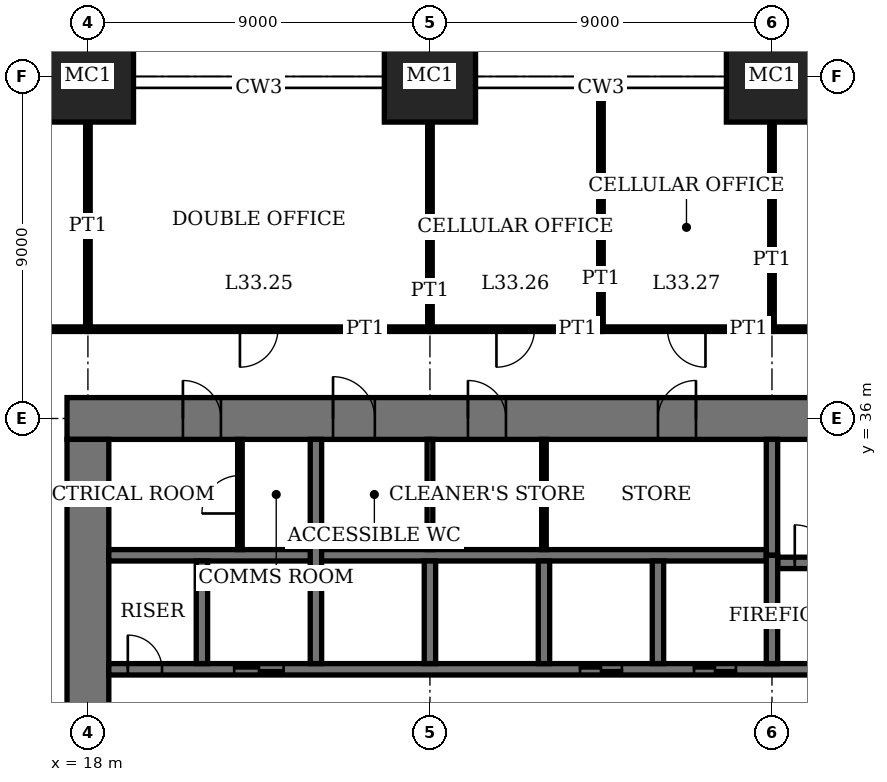
"""IFC4 building model, lengths in metres.
Left out: names, types, materials, properties, quantities, classifications, styles, units other than length and angle.
Written with IfcOpenShell. Run it as: python <this file> out.ifc"""

import sys

from ifc_helpers import new_model, si_unit, direction, frame, frame_2d, origin, origin_2d, place, context, subcontext, project, spatial, rectangle, extrude, element, fill, save


model = new_model("IFC4")
c1 = context("Model", 3, precision=1e-05, world=origin(), true_north=direction((0.0, 1.0)))
c2 = subcontext(c1, "Body", "Model", "MODEL_VIEW")
j1 = project(units=[si_unit("LENGTHUNIT", "METRE"), si_unit("PLANEANGLEUNIT", "RADIAN")], contexts=[c1])
p1 = place(None, origin())
s1 = spatial("IfcSite", under=j1, at=p1, CompositionType="ELEMENT")
p2 = place(p1, origin())
s2 = spatial("IfcBuilding", under=s1, at=p2, CompositionType="ELEMENT")
p3 = place(p2, frame((0.0, 0.0, 137.0)))
s3 = spatial("IfcBuildingStorey", under=s2, at=p3, CompositionType="ELEMENT", Elevation=137.0)
for number, where, z_axis, x_axis in (
    (1, (18.0, 45.0, 0.0), (0.0, 0.0, 1.0), (1.0, 0.0, 0.0)),
    (2, (27.0, 45.0, 0.0), (0.0, 0.0, 1.0), (1.0, 0.0, 0.0)),
    (3, (36.0, 45.0, 0.0), (0.0, 0.0, 1.0), (1.0, 0.0, 0.0)),
):
    element("IfcColumn", number, at=place(p3, frame(where, z_axis=z_axis, x_axis=x_axis)), inside=s3, PredefinedType="COLUMN", context=c2, shape_type="SweptSolid", body=[
        extrude(rectangle(XDim=2.4, YDim=2.4, at=origin_2d()), origin(), (0.0, 0.0, 1.0), 4.0),
    ])
p4 = place(p3, frame((45.55, 36.0, 0.0), z_axis=(0.0, 0.0, 1.0), x_axis=(-1.0, 0.0, 0.0)))
e4 = element("IfcWall", 4, at=p4, inside=s3, PredefinedType="SHEAR", context=c2, shape_type="SweptSolid", body=[
    extrude(rectangle(XDim=28.1, YDim=1.1, at=frame_2d((14.05, 0.0))), origin(), (0.0, 0.0, 1.0), 4.0),
])
p5 = place(p4, frame((11.55, 0.0, 0.0)))
e5 = element("IfcOpeningElement", 5, at=p5, cuts=e4, PredefinedType="OPENING", context=c2, shape_type="SweptSolid", body=[
    extrude(rectangle(XDim=1.0, YDim=2.4, at=frame_2d((0.5, 1.2))), frame((0.0, 0.56, 0.0), z_axis=(0.0, -1.0, 0.0), x_axis=(1.0, 0.0, 0.0)), (0.0, 0.0, 1.0), 1.12),
])
p6 = place(p4, frame((16.55, 0.0, 0.0)))
e6 = element("IfcOpeningElement", 6, at=p6, cuts=e4, PredefinedType="OPENING", context=c2, shape_type="SweptSolid", body=[
    extrude(rectangle(XDim=1.0, YDim=2.4, at=frame_2d((0.5, 1.2))), frame((0.0, 0.56, 0.0), z_axis=(0.0, -1.0, 0.0), x_axis=(1.0, 0.0, 0.0)), (0.0, 0.0, 1.0), 1.12),
])
p7 = place(p4, frame((20.0, 0.0, 0.0)))
e7 = element("IfcOpeningElement", 7, at=p7, cuts=e4, PredefinedType="OPENING", context=c2, shape_type="SweptSolid", body=[
    extrude(rectangle(XDim=1.1, YDim=2.4, at=frame_2d((0.55, 1.2))), frame((0.0, 0.56, 0.0), z_axis=(0.0, -1.0, 0.0), x_axis=(1.0, 0.0, 0.0)), (0.0, 0.0, 1.0), 1.12),
])
p8 = place(p4, frame((24.05, 0.0, 0.0)))
e8 = element("IfcOpeningElement", 8, at=p8, cuts=e4, PredefinedType="OPENING", context=c2, shape_type="SweptSolid", body=[
    extrude(rectangle(XDim=1.0, YDim=2.4, at=frame_2d((0.5, 1.2))), frame((0.0, 0.56, 0.0), z_axis=(0.0, -1.0, 0.0), x_axis=(1.0, 0.0, 0.0)), (0.0, 0.0, 1.0), 1.12),
])
p9 = place(p3, frame((18.0, 35.45, 0.0), z_axis=(0.0, 0.0, 1.0), x_axis=(0.0, -1.0, 0.0)))
e9 = element("IfcWall", 9, at=p9, inside=s3, PredefinedType="SHEAR", context=c2, shape_type="SweptSolid", body=[
    extrude(rectangle(XDim=16.9, YDim=1.1, at=frame_2d((8.45, 0.0))), origin(), (0.0, 0.0, 1.0), 4.0),
])
p10 = place(p9, frame((8.45, 0.0, 0.0)))
e10 = element("IfcOpeningElement", 10, at=p10, cuts=e9, PredefinedType="OPENING", context=c2, shape_type="SweptSolid", body=[
    extrude(rectangle(XDim=1.8, YDim=2.4, at=frame_2d((0.9, 1.2))), frame((0.0, 0.56, 0.0), z_axis=(0.0, -1.0, 0.0), x_axis=(1.0, 0.0, 0.0)), (0.0, 0.0, 1.0), 1.12),
])
p11 = place(p3, frame((36.15, 32.2, 0.0), z_axis=(0.0, 0.0, 1.0), x_axis=(1.0, 0.0, 0.0)))
e11 = element("IfcWall", 11, at=p11, inside=s3, PredefinedType="SHEAR", context=c2, shape_type="SweptSolid", body=[
    extrude(rectangle(XDim=8.3, YDim=0.3, at=frame_2d((4.15, 0.0))), origin(), (0.0, 0.0, 1.0), 4.0),
])
p12 = place(p11, frame((0.45, 0.0, 0.0)))
e12 = element("IfcOpeningElement", 12, at=p12, cuts=e11, PredefinedType="OPENING", context=c2, shape_type="SweptSolid", body=[
    extrude(rectangle(XDim=1.0, YDim=2.4, at=frame_2d((0.5, 1.2))), frame((0.0, 0.16, 0.0), z_axis=(0.0, -1.0, 0.0), x_axis=(1.0, 0.0, 0.0)), (0.0, 0.0, 1.0), 0.32),
])
p13 = place(p3, frame((36.0, 32.4, 0.0), z_axis=(0.0, 0.0, 1.0), x_axis=(0.0, 1.0, 0.0)))
e13 = element("IfcWall", 13, at=p13, inside=s3, PredefinedType="SHEAR", context=c2, shape_type="SweptSolid", body=[
    extrude(rectangle(XDim=3.05, YDim=0.3, at=frame_2d((1.525, 0.0))), origin(), (0.0, 0.0, 1.0), 4.0),
])
p14 = place(p3, frame((18.55, 29.4, 0.0), z_axis=(0.0, 0.0, 1.0), x_axis=(1.0, 0.0, 0.0)))
e14 = element("IfcWall", 14, at=p14, inside=s3, PredefinedType="SHEAR", context=c2, shape_type="SweptSolid", body=[
    extrude(rectangle(XDim=25.9, YDim=0.3, at=frame_2d((12.95, 0.0))), origin(), (0.0, 0.0, 1.0), 4.0),
])
p15 = place(p14, frame((19.95, 0.0, 0.0)))
e15 = element("IfcOpeningElement", 15, at=p15, cuts=e14, PredefinedType="OPENING", context=c2, shape_type="SweptSolid", body=[
    extrude(rectangle(XDim=1.0, YDim=2.4, at=frame_2d((0.5, 1.2))), frame((0.0, 0.16, 0.0), z_axis=(0.0, -1.0, 0.0), x_axis=(1.0, 0.0, 0.0)), (0.0, 0.0, 1.0), 0.32),
])
p16 = place(p14, frame((0.5, 0.0, 0.0)))
e16 = element("IfcOpeningElement", 16, at=p16, cuts=e14, PredefinedType="OPENING", context=c2, shape_type="SweptSolid", body=[
    extrude(rectangle(XDim=0.9, YDim=2.1, at=frame_2d((0.45, 1.05))), frame((0.0, 0.16, 0.0), z_axis=(0.0, -1.0, 0.0), x_axis=(1.0, 0.0, 0.0)), (0.0, 0.0, 1.0), 0.32),
])
p17 = place(p14, frame((15.4, 0.0, 0.0)))
e17 = element("IfcOpeningElement", 17, at=p17, cuts=e14, PredefinedType="OPENING", context=c2, shape_type="SweptSolid", body=[
    extrude(rectangle(XDim=1.1, YDim=2.4, at=frame_2d((0.55, 1.2))), frame((0.0, 0.16, 0.0), z_axis=(0.0, -1.0, 0.0), x_axis=(1.0, 0.0, 0.0)), (0.0, 0.0, 1.0), 0.32),
])
p18 = place(p14, frame((12.4, 0.0, 0.0)))
e18 = element("IfcOpeningElement", 18, at=p18, cuts=e14, PredefinedType="OPENING", context=c2, shape_type="SweptSolid", body=[
    extrude(rectangle(XDim=1.1, YDim=2.4, at=frame_2d((0.55, 1.2))), frame((0.0, 0.16, 0.0), z_axis=(0.0, -1.0, 0.0), x_axis=(1.0, 0.0, 0.0)), (0.0, 0.0, 1.0), 0.32),
])
p19 = place(p14, frame((3.3, 0.0, 0.0)))
e19 = element("IfcOpeningElement", 19, at=p19, cuts=e14, PredefinedType="OPENING", context=c2, shape_type="SweptSolid", body=[
    extrude(rectangle(XDim=1.3, YDim=2.4, at=frame_2d((0.65, 1.2))), frame((0.0, 0.16, 0.0), z_axis=(0.0, -1.0, 0.0), x_axis=(1.0, 0.0, 0.0)), (0.0, 0.0, 1.0), 0.32),
])
p20 = place(p3, frame((18.55, 32.4, 0.0), z_axis=(0.0, 0.0, 1.0), x_axis=(1.0, 0.0, 0.0)))
e20 = element("IfcWall", 20, at=p20, inside=s3, PredefinedType="SHEAR", context=c2, shape_type="SweptSolid", body=[
    extrude(rectangle(XDim=17.3, YDim=0.3, at=frame_2d((8.65, 0.0))), origin(), (0.0, 0.0, 1.0), 4.0),
])
for number, where, z_axis, x_axis in (
    (21, (33.0, 29.55, 0.0), (0.0, 0.0, 1.0), (0.0, 1.0, 0.0)),
    (22, (30.0, 29.55, 0.0), (0.0, 0.0, 1.0), (0.0, 1.0, 0.0)),
    (23, (27.0, 29.55, 0.0), (0.0, 0.0, 1.0), (0.0, 1.0, 0.0)),
):
    element("IfcWall", number, at=place(p3, frame(where, z_axis=z_axis, x_axis=x_axis)), inside=s3, PredefinedType="SHEAR", context=c2, shape_type="SweptSolid", body=[
        extrude(rectangle(XDim=2.7, YDim=0.3, at=frame_2d((1.35, 0.0))), origin(), (0.0, 0.0, 1.0), 4.0),
    ])
p21 = place(p3, frame((24.0, 29.55, 0.0), z_axis=(0.0, 0.0, 1.0), x_axis=(0.0, 1.0, 0.0)))
e24 = element("IfcWall", 24, at=p21, inside=s3, PredefinedType="SHEAR", context=c2, shape_type="SweptSolid", body=[
    extrude(rectangle(XDim=5.9, YDim=0.3, at=frame_2d((2.95, 0.0))), origin(), (0.0, 0.0, 1.0), 4.0),
])
p22 = place(p3, frame((21.0, 29.55, 0.0), z_axis=(0.0, 0.0, 1.0), x_axis=(0.0, 1.0, 0.0)))
e25 = element("IfcWall", 25, at=p22, inside=s3, PredefinedType="SHEAR", context=c2, shape_type="SweptSolid", body=[
    extrude(rectangle(XDim=2.7, YDim=0.3, at=frame_2d((1.35, 0.0))), origin(), (0.0, 0.0, 1.0), 4.0),
])
p23 = place(p3, frame((36.0, 29.55, 0.0), z_axis=(0.0, 0.0, 1.0), x_axis=(0.0, 1.0, 0.0)))
e26 = element("IfcWall", 26, at=p23, inside=s3, PredefinedType="SHEAR", context=c2, shape_type="SweptSolid", body=[
    extrude(rectangle(XDim=2.85, YDim=0.3, at=frame_2d((1.425, 0.0))), origin(), (0.0, 0.0, 1.0), 4.0),
])
p24 = place(p3, frame((9.0, 38.35, 0.0), z_axis=(0.0, 0.0, 1.0), x_axis=(1.0, 0.0, 0.0)))
e27 = element("IfcWall", 27, at=p24, inside=s3, PredefinedType="PARTITIONING", context=c2, shape_type="SweptSolid", body=[
    extrude(rectangle(XDim=9.0, YDim=0.12, at=frame_2d((4.5, 0.0))), origin(), (0.0, 0.0, 1.0), 3.75),
])
p25 = place(p24, frame((4.0, 0.0, 0.0)))
e28 = element("IfcOpeningElement", 28, at=p25, cuts=e27, PredefinedType="OPENING", context=c2, shape_type="SweptSolid", body=[
    extrude(rectangle(XDim=1.0, YDim=2.4, at=frame_2d((0.5, 1.2))), frame((0.0, 0.07, 0.0), z_axis=(0.0, -1.0, 0.0), x_axis=(1.0, 0.0, 0.0)), (0.0, 0.0, 1.0), 0.14),
])
p26 = place(p3, frame((18.0, 38.35, 0.0), z_axis=(0.0, 0.0, 1.0), x_axis=(1.0, 0.0, 0.0)))
e29 = element("IfcWall", 29, at=p26, inside=s3, PredefinedType="PARTITIONING", context=c2, shape_type="SweptSolid", body=[
    extrude(rectangle(XDim=9.0, YDim=0.12, at=frame_2d((4.5, 0.0))), origin(), (0.0, 0.0, 1.0), 3.75),
])
p27 = place(p26, frame((4.0, 0.0, 0.0)))
e30 = element("IfcOpeningElement", 30, at=p27, cuts=e29, PredefinedType="OPENING", context=c2, shape_type="SweptSolid", body=[
    extrude(rectangle(XDim=1.0, YDim=2.4, at=frame_2d((0.5, 1.2))), frame((0.0, 0.07, 0.0), z_axis=(0.0, -1.0, 0.0), x_axis=(1.0, 0.0, 0.0)), (0.0, 0.0, 1.0), 0.14),
])
p28 = place(p3, frame((27.0, 38.35, 0.0), z_axis=(0.0, 0.0, 1.0), x_axis=(1.0, 0.0, 0.0)))
e31 = element("IfcWall", 31, at=p28, inside=s3, PredefinedType="PARTITIONING", context=c2, shape_type="SweptSolid", body=[
    extrude(rectangle(XDim=4.5, YDim=0.12, at=frame_2d((2.25, 0.0))), origin(), (0.0, 0.0, 1.0), 3.75),
])
p29 = place(p28, frame((1.75, 0.0, 0.0)))
e32 = element("IfcOpeningElement", 32, at=p29, cuts=e31, PredefinedType="OPENING", context=c2, shape_type="SweptSolid", body=[
    extrude(rectangle(XDim=1.0, YDim=2.4, at=frame_2d((0.5, 1.2))), frame((0.0, 0.07, 0.0), z_axis=(0.0, -1.0, 0.0), x_axis=(1.0, 0.0, 0.0)), (0.0, 0.0, 1.0), 0.14),
])
p30 = place(p3, frame((31.5, 38.35, 0.0), z_axis=(0.0, 0.0, 1.0), x_axis=(1.0, 0.0, 0.0)))
e33 = element("IfcWall", 33, at=p30, inside=s3, PredefinedType="PARTITIONING", context=c2, shape_type="SweptSolid", body=[
    extrude(rectangle(XDim=4.5, YDim=0.12, at=frame_2d((2.25, 0.0))), origin(), (0.0, 0.0, 1.0), 3.75),
])
p31 = place(p30, frame((1.75, 0.0, 0.0)))
e34 = element("IfcOpeningElement", 34, at=p31, cuts=e33, PredefinedType="OPENING", context=c2, shape_type="SweptSolid", body=[
    extrude(rectangle(XDim=1.0, YDim=2.4, at=frame_2d((0.5, 1.2))), frame((0.0, 0.07, 0.0), z_axis=(0.0, -1.0, 0.0), x_axis=(1.0, 0.0, 0.0)), (0.0, 0.0, 1.0), 0.14),
])
p32 = place(p3, frame((36.0, 38.35, 0.0), z_axis=(0.0, 0.0, 1.0), x_axis=(1.0, 0.0, 0.0)))
e35 = element("IfcWall", 35, at=p32, inside=s3, PredefinedType="PARTITIONING", context=c2, shape_type="SweptSolid", body=[
    extrude(rectangle(XDim=9.0, YDim=0.12, at=frame_2d((4.5, 0.0))), origin(), (0.0, 0.0, 1.0), 3.75),
])
p33 = place(p32, frame((4.0, 0.0, 0.0)))
e36 = element("IfcOpeningElement", 36, at=p33, cuts=e35, PredefinedType="OPENING", context=c2, shape_type="SweptSolid", body=[
    extrude(rectangle(XDim=1.0, YDim=2.4, at=frame_2d((0.5, 1.2))), frame((0.0, 0.07, 0.0), z_axis=(0.0, -1.0, 0.0), x_axis=(1.0, 0.0, 0.0)), (0.0, 0.0, 1.0), 0.14),
])
for number, where, z_axis, x_axis in (
    (37, (18.0, 38.35, 0.0), (0.0, 0.0, 1.0), (0.0, 1.0, 0.0)),
    (38, (27.0, 38.35, 0.0), (0.0, 0.0, 1.0), (0.0, 1.0, 0.0)),
):
    element("IfcWall", number, at=place(p3, frame(where, z_axis=z_axis, x_axis=x_axis)), inside=s3, PredefinedType="PARTITIONING", context=c2, shape_type="SweptSolid", body=[
        extrude(rectangle(XDim=5.45, YDim=0.12, at=frame_2d((2.725, 0.0))), origin(), (0.0, 0.0, 1.0), 3.05),
    ])
p34 = place(p3, frame((31.5, 38.35, 0.0), z_axis=(0.0, 0.0, 1.0), x_axis=(0.0, 1.0, 0.0)))
e39 = element("IfcWall", 39, at=p34, inside=s3, PredefinedType="PARTITIONING", context=c2, shape_type="SweptSolid", body=[
    extrude(rectangle(XDim=6.34, YDim=0.12, at=frame_2d((3.17, 0.0))), origin(), (0.0, 0.0, 1.0), 3.75),
])
p35 = place(p3, frame((36.0, 38.35, 0.0), z_axis=(0.0, 0.0, 1.0), x_axis=(0.0, 1.0, 0.0)))
e40 = element("IfcWall", 40, at=p35, inside=s3, PredefinedType="PARTITIONING", context=c2, shape_type="SweptSolid", body=[
    extrude(rectangle(XDim=5.45, YDim=0.12, at=frame_2d((2.725, 0.0))), origin(), (0.0, 0.0, 1.0), 3.05),
])
p36 = place(p3, frame((30.0, 32.55, 0.0), z_axis=(0.0, 0.0, 1.0), x_axis=(0.0, 1.0, 0.0)))
e41 = element("IfcWall", 41, at=p36, inside=s3, PredefinedType="PARTITIONING", context=c2, shape_type="SweptSolid", body=[
    extrude(rectangle(XDim=2.9, YDim=0.12, at=frame_2d((1.45, 0.0))), origin(), (0.0, 0.0, 1.0), 3.75),
])
p37 = place(p3, frame((27.0, 32.55, 0.0), z_axis=(0.0, 0.0, 1.0), x_axis=(0.0, 1.0, 0.0)))
e42 = element("IfcWall", 42, at=p37, inside=s3, PredefinedType="PARTITIONING", context=c2, shape_type="SweptSolid", body=[
    extrude(rectangle(XDim=2.9, YDim=0.15, at=frame_2d((1.45, 0.0))), origin(), (0.0, 0.0, 1.0), 3.75),
])
p38 = place(p3, frame((22.0, 32.55, 0.0), z_axis=(0.0, 0.0, 1.0), x_axis=(0.0, 1.0, 0.0)))
e43 = element("IfcWall", 43, at=p38, inside=s3, PredefinedType="PARTITIONING", context=c2, shape_type="SweptSolid", body=[
    extrude(rectangle(XDim=2.9, YDim=0.12, at=frame_2d((1.45, 0.0))), origin(), (0.0, 0.0, 1.0), 3.75),
])
p39 = place(p38, frame((0.95, 0.0, 0.0)))
e44 = element("IfcOpeningElement", 44, at=p39, cuts=e43, PredefinedType="OPENING", context=c2, shape_type="SweptSolid", body=[
    extrude(rectangle(XDim=1.0, YDim=2.4, at=frame_2d((0.5, 1.2))), frame((0.0, 0.07, 0.0), z_axis=(0.0, -1.0, 0.0), x_axis=(1.0, 0.0, 0.0)), (0.0, 0.0, 1.0), 0.14),
])
p40 = place(p5, origin())
e45 = element("IfcDoor", 45, at=p40, inside=s3, OperationType="SINGLE_SWING_LEFT", PredefinedType="DOOR", context=c2, shape_type="SweptSolid", body=[
    extrude(rectangle(XDim=1.0, YDim=2.4, at=frame_2d((0.5, 1.2))), frame((0.0, 0.025, 0.0), z_axis=(0.0, -1.0, 0.0), x_axis=(1.0, 0.0, 0.0)), (0.0, 0.0, 1.0), 0.05),
    extrude(rectangle(XDim=0.04, YDim=2.4, at=frame_2d((0.02, 1.2))), frame((0.0, 0.4, 0.0), z_axis=(0.0, -1.0, 0.0), x_axis=(1.0, 0.0, 0.0)), (0.0, 0.0, 1.0), 0.8),
    extrude(rectangle(XDim=0.04, YDim=2.4, at=frame_2d((0.98, 1.2))), frame((0.0, 0.4, 0.0), z_axis=(0.0, -1.0, 0.0), x_axis=(1.0, 0.0, 0.0)), (0.0, 0.0, 1.0), 0.8),
    extrude(rectangle(XDim=1.0, YDim=0.04, at=frame_2d((0.5, 2.38))), frame((0.0, 0.4, 0.0), z_axis=(0.0, -1.0, 0.0), x_axis=(1.0, 0.0, 0.0)), (0.0, 0.0, 1.0), 0.8),
])
fill(e5, e45)
p41 = place(p6, origin())
e46 = element("IfcDoor", 46, at=p41, inside=s3, OperationType="SINGLE_SWING_RIGHT", PredefinedType="DOOR", context=c2, shape_type="SweptSolid", body=[
    extrude(rectangle(XDim=1.0, YDim=2.4, at=frame_2d((0.5, 1.2))), frame((0.0, 0.025, 0.0), z_axis=(0.0, -1.0, 0.0), x_axis=(1.0, 0.0, 0.0)), (0.0, 0.0, 1.0), 0.05),
    extrude(rectangle(XDim=0.04, YDim=2.4, at=frame_2d((0.02, 1.2))), frame((0.0, 0.4, 0.0), z_axis=(0.0, -1.0, 0.0), x_axis=(1.0, 0.0, 0.0)), (0.0, 0.0, 1.0), 0.8),
    extrude(rectangle(XDim=0.04, YDim=2.4, at=frame_2d((0.98, 1.2))), frame((0.0, 0.4, 0.0), z_axis=(0.0, -1.0, 0.0), x_axis=(1.0, 0.0, 0.0)), (0.0, 0.0, 1.0), 0.8),
    extrude(rectangle(XDim=1.0, YDim=0.04, at=frame_2d((0.5, 2.38))), frame((0.0, 0.4, 0.0), z_axis=(0.0, -1.0, 0.0), x_axis=(1.0, 0.0, 0.0)), (0.0, 0.0, 1.0), 0.8),
])
fill(e6, e46)
p42 = place(p7, origin())
e47 = element("IfcDoor", 47, at=p42, inside=s3, OperationType="SINGLE_SWING_RIGHT", PredefinedType="DOOR", context=c2, shape_type="SweptSolid", body=[
    extrude(rectangle(XDim=1.1, YDim=2.4, at=frame_2d((0.55, 1.2))), frame((0.0, 0.025, 0.0), z_axis=(0.0, -1.0, 0.0), x_axis=(1.0, 0.0, 0.0)), (0.0, 0.0, 1.0), 0.05),
    extrude(rectangle(XDim=0.04, YDim=2.4, at=frame_2d((0.02, 1.2))), frame((0.0, 0.44, 0.0), z_axis=(0.0, -1.0, 0.0), x_axis=(1.0, 0.0, 0.0)), (0.0, 0.0, 1.0), 0.88),
    extrude(rectangle(XDim=0.04, YDim=2.4, at=frame_2d((1.08, 1.2))), frame((0.0, 0.44, 0.0), z_axis=(0.0, -1.0, 0.0), x_axis=(1.0, 0.0, 0.0)), (0.0, 0.0, 1.0), 0.88),
    extrude(rectangle(XDim=1.1, YDim=0.04, at=frame_2d((0.55, 2.38))), frame((0.0, 0.44, 0.0), z_axis=(0.0, -1.0, 0.0), x_axis=(1.0, 0.0, 0.0)), (0.0, 0.0, 1.0), 0.88),
])
fill(e7, e47)
p43 = place(p8, origin())
e48 = element("IfcDoor", 48, at=p43, inside=s3, OperationType="SINGLE_SWING_RIGHT", PredefinedType="DOOR", context=c2, shape_type="SweptSolid", body=[
    extrude(rectangle(XDim=1.0, YDim=2.4, at=frame_2d((0.5, 1.2))), frame((0.0, 0.025, 0.0), z_axis=(0.0, -1.0, 0.0), x_axis=(1.0, 0.0, 0.0)), (0.0, 0.0, 1.0), 0.05),
    extrude(rectangle(XDim=0.04, YDim=2.4, at=frame_2d((0.02, 1.2))), frame((0.0, 0.4, 0.0), z_axis=(0.0, -1.0, 0.0), x_axis=(1.0, 0.0, 0.0)), (0.0, 0.0, 1.0), 0.8),
    extrude(rectangle(XDim=0.04, YDim=2.4, at=frame_2d((0.98, 1.2))), frame((0.0, 0.4, 0.0), z_axis=(0.0, -1.0, 0.0), x_axis=(1.0, 0.0, 0.0)), (0.0, 0.0, 1.0), 0.8),
    extrude(rectangle(XDim=1.0, YDim=0.04, at=frame_2d((0.5, 2.38))), frame((0.0, 0.4, 0.0), z_axis=(0.0, -1.0, 0.0), x_axis=(1.0, 0.0, 0.0)), (0.0, 0.0, 1.0), 0.8),
])
fill(e8, e48)
p44 = place(p12, origin())
e49 = element("IfcDoor", 49, at=p44, inside=s3, OperationType="SINGLE_SWING_RIGHT", PredefinedType="DOOR", context=c2, shape_type="SweptSolid", body=[
    extrude(rectangle(XDim=1.0, YDim=2.4, at=frame_2d((0.5, 1.2))), frame((0.0, 0.03, 0.0), z_axis=(0.0, -1.0, 0.0), x_axis=(1.0, 0.0, 0.0)), (0.0, 0.0, 1.0), 0.06),
])
fill(e12, e49)
p45 = place(p16, origin())
e50 = element("IfcDoor", 50, at=p45, inside=s3, OperationType="SINGLE_SWING_RIGHT", PredefinedType="DOOR", context=c2, shape_type="SweptSolid", body=[
    extrude(rectangle(XDim=0.9, YDim=2.1, at=frame_2d((0.45, 1.05))), frame((0.0, 0.03, 0.0), z_axis=(0.0, -1.0, 0.0), x_axis=(1.0, 0.0, 0.0)), (0.0, 0.0, 1.0), 0.06),
])
fill(e16, e50)
p46 = place(p27, origin())
e51 = element("IfcDoor", 51, at=p46, inside=s3, OperationType="SINGLE_SWING_LEFT", PredefinedType="DOOR", context=c2, shape_type="SweptSolid", body=[
    extrude(rectangle(XDim=1.0, YDim=2.4, at=frame_2d((0.5, 1.2))), frame((0.0, 0.025, 0.0), z_axis=(0.0, -1.0, 0.0), x_axis=(1.0, 0.0, 0.0)), (0.0, 0.0, 1.0), 0.05),
])
fill(e30, e51)
p47 = place(p29, origin())
e52 = element("IfcDoor", 52, at=p47, inside=s3, OperationType="SINGLE_SWING_LEFT", PredefinedType="DOOR", context=c2, shape_type="SweptSolid", body=[
    extrude(rectangle(XDim=1.0, YDim=2.4, at=frame_2d((0.5, 1.2))), frame((0.0, 0.025, 0.0), z_axis=(0.0, -1.0, 0.0), x_axis=(1.0, 0.0, 0.0)), (0.0, 0.0, 1.0), 0.05),
])
fill(e32, e52)
p48 = place(p31, origin())
e53 = element("IfcDoor", 53, at=p48, inside=s3, OperationType="SINGLE_SWING_RIGHT", PredefinedType="DOOR", context=c2, shape_type="SweptSolid", body=[
    extrude(rectangle(XDim=1.0, YDim=2.4, at=frame_2d((0.5, 1.2))), frame((0.0, 0.025, 0.0), z_axis=(0.0, -1.0, 0.0), x_axis=(1.0, 0.0, 0.0)), (0.0, 0.0, 1.0), 0.05),
])
fill(e34, e53)
p49 = place(p39, origin())
e54 = element("IfcDoor", 54, at=p49, inside=s3, OperationType="SINGLE_SWING_RIGHT", PredefinedType="DOOR", context=c2, shape_type="SweptSolid", body=[
    extrude(rectangle(XDim=1.0, YDim=2.4, at=frame_2d((0.5, 1.2))), frame((0.0, 0.03, 0.0), z_axis=(0.0, -1.0, 0.0), x_axis=(1.0, 0.0, 0.0)), (0.0, 0.0, 1.0), 0.06),
])
fill(e44, e54)
p50 = place(p17, origin())
e55 = element("IfcDoor", 55, at=p50, inside=s3, OperationType="DOUBLE_DOOR_SLIDING", PredefinedType="DOOR", context=c2, shape_type="SweptSolid", body=[
    extrude(rectangle(XDim=1.1, YDim=2.4, at=frame_2d((0.55, 1.2))), frame((0.0, 0.02, 0.0), z_axis=(0.0, -1.0, 0.0), x_axis=(1.0, 0.0, 0.0)), (0.0, 0.0, 1.0), 0.04),
])
fill(e17, e55)
p51 = place(p18, origin())
e56 = element("IfcDoor", 56, at=p51, inside=s3, OperationType="DOUBLE_DOOR_SLIDING", PredefinedType="DOOR", context=c2, shape_type="SweptSolid", body=[
    extrude(rectangle(XDim=1.1, YDim=2.4, at=frame_2d((0.55, 1.2))), frame((0.0, 0.02, 0.0), z_axis=(0.0, -1.0, 0.0), x_axis=(1.0, 0.0, 0.0)), (0.0, 0.0, 1.0), 0.04),
])
fill(e18, e56)
p52 = place(p19, origin())
e57 = element("IfcDoor", 57, at=p52, inside=s3, OperationType="DOUBLE_DOOR_SLIDING", PredefinedType="DOOR", context=c2, shape_type="SweptSolid", body=[
    extrude(rectangle(XDim=1.3, YDim=2.4, at=frame_2d((0.65, 1.2))), frame((0.0, 0.02, 0.0), z_axis=(0.0, -1.0, 0.0), x_axis=(1.0, 0.0, 0.0)), (0.0, 0.0, 1.0), 0.04),
])
fill(e19, e57)
save(model, sys.argv[1])
